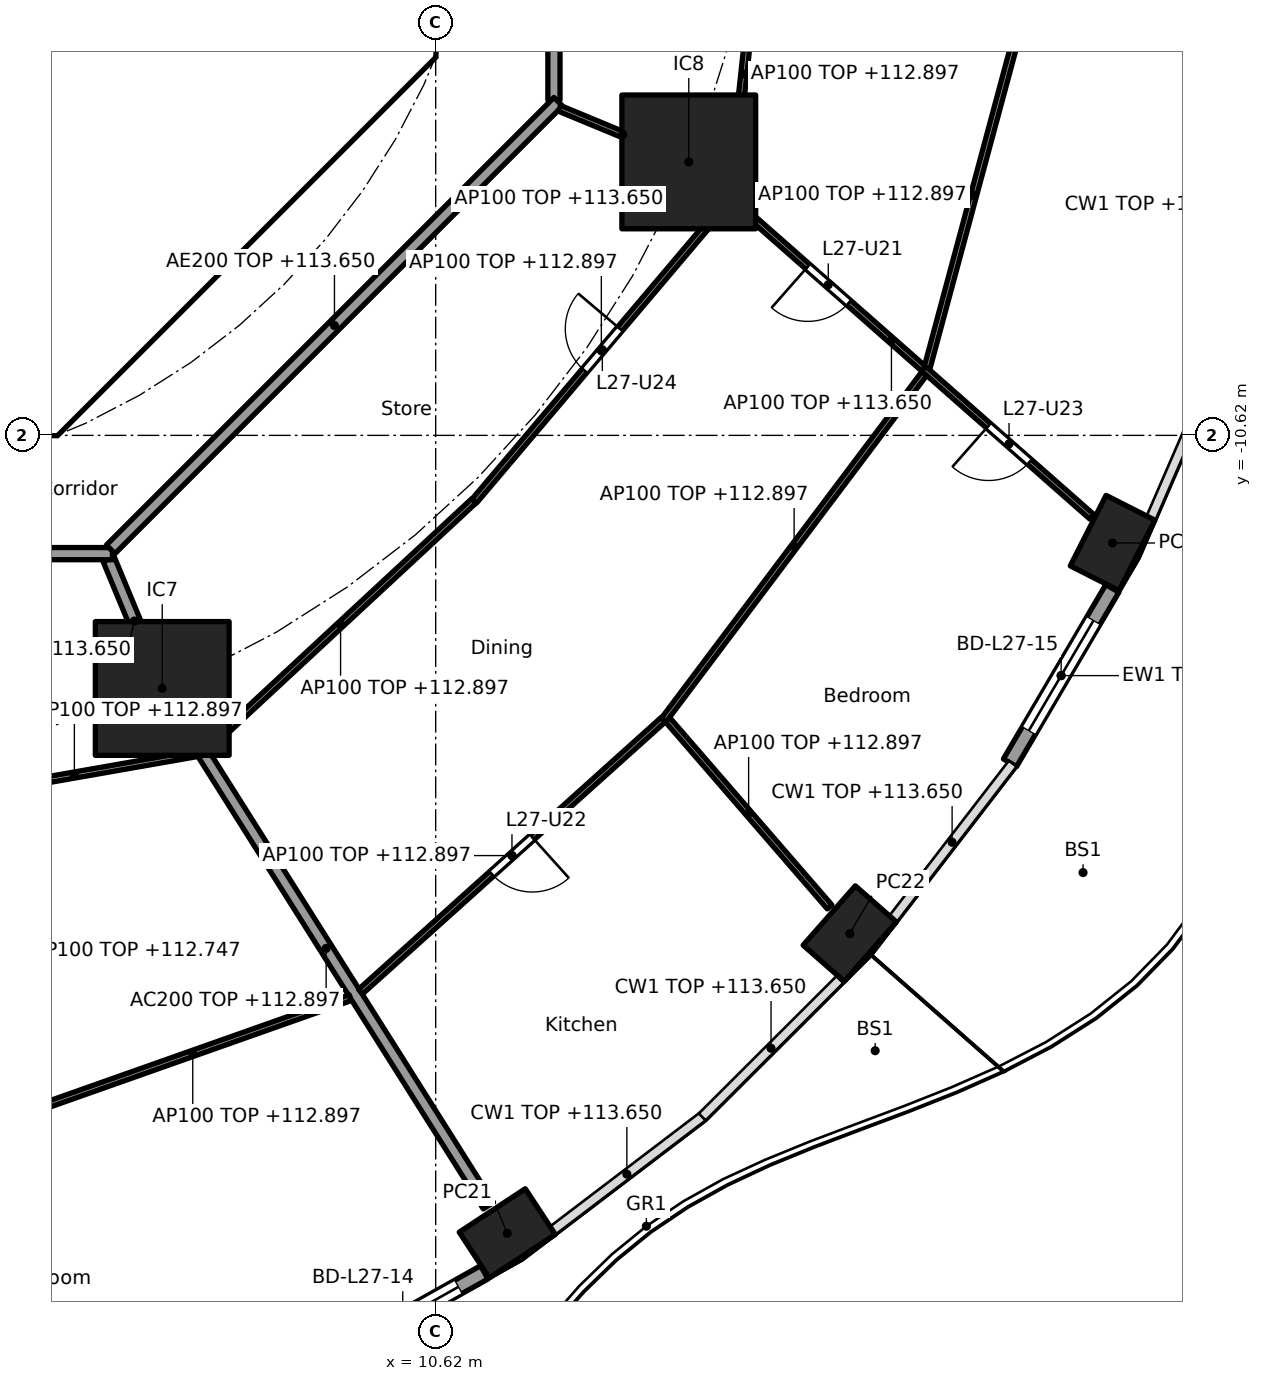
"""IFC4 building model, lengths in metres.
Left out: names, types, materials, properties, quantities, classifications, styles, units other than length and angle.
Written with IfcOpenShell. Run it as: python <this file> out.ifc"""

import sys

from ifc_helpers import new_model, si_unit, direction, frame, frame_2d, origin, origin_2d, place, context, subcontext, project, spatial, polyline, rectangle, hollow_rectangle, outline, extrude, element, fill, save


model = new_model("IFC4")
c1 = context("Model", 3, precision=1e-05, world=origin(), true_north=direction((0.0, 1.0)))
c2 = subcontext(c1, "Body", "Model", "MODEL_VIEW")
j1 = project(units=[si_unit("LENGTHUNIT", "METRE"), si_unit("PLANEANGLEUNIT", "RADIAN")], contexts=[c1])
p1 = place(None, origin())
s1 = spatial("IfcSite", under=j1, at=p1, CompositionType="ELEMENT")
p2 = place(p1, origin())
s2 = spatial("IfcBuilding", under=s1, at=p2, CompositionType="ELEMENT")
p3 = place(p2, frame((0.0, 0.0, 110.3)))
s3 = spatial("IfcBuildingStorey", under=s2, at=p3, CompositionType="ELEMENT", Elevation=110.3)
for number, where, z_axis, x_axis in (
    (1, (11.798, -23.742, 0.0), (0.0, 0.0, 1.0), (0.836, 0.549, 0.0)),
    (2, (17.43, -18.813, 0.0), (0.0, 0.0, 1.0), (0.66, 0.751, 0.0)),
    (3, (21.751, -12.39, 0.0), (0.0, 0.0, 1.0), (0.452, 0.892, 0.0)),
):
    element("IfcColumn", number, at=place(p3, frame(where, z_axis=z_axis, x_axis=x_axis)), inside=s3, PredefinedType="COLUMN", context=c2, shape_type="SweptSolid", body=[
        extrude(hollow_rectangle(XDim=1.3, YDim=0.9, WallThickness=0.045, at=origin_2d()), origin(), (0.0, 0.0, 1.0), 3.7),
    ])
for number, where, z_axis, x_axis in (
    (4, (6.123, -14.782, 0.0), (0.0, 0.0, 1.0), (1.0, 0.0, 0.0)),
    (5, (14.782, -6.123, 0.0), (0.0, 0.0, 1.0), (1.0, 0.0, 0.0)),
):
    element("IfcColumn", number, at=place(p3, frame(where, z_axis=z_axis, x_axis=x_axis)), inside=s3, PredefinedType="COLUMN", context=c2, shape_type="SweptSolid", body=[
        extrude(rectangle(XDim=2.2, YDim=2.2, at=origin_2d()), origin(), (0.0, 0.0, 1.0), 3.7),
    ])
p4 = place(p3, frame((11.419, -24.384, 0.0), z_axis=(0.0, 0.0, 1.0), x_axis=(-0.872071158476, -0.489379090843, 0.0)))
e6 = element("IfcWall", 6, at=p4, inside=s3, PredefinedType="SOLIDWALL", context=c2, shape_type="SweptSolid", body=[
    extrude(rectangle(XDim=3.076, YDim=0.25, at=frame_2d((1.538, 0.0))), origin(), (0.0, 0.0, 1.0), 3.35),
])
p5 = place(p4, frame((0.488, 0.0, 0.0)))
e7 = element("IfcOpeningElement", 7, at=p5, cuts=e6, PredefinedType="OPENING", context=c2, shape_type="SweptSolid", body=[
    extrude(rectangle(XDim=2.1, YDim=2.4, at=frame_2d((1.05, 1.2))), frame((0.0, 0.135, 0.0), z_axis=(0.0, -1.0, 0.0), x_axis=(1.0, 0.0, 0.0)), (0.0, 0.0, 1.0), 0.27),
])
p6 = place(p3, frame((21.748, -13.137, 0.0), z_axis=(0.0, 0.0, 1.0), x_axis=(-0.506297921217, -0.862358634775, 0.0)))
e8 = element("IfcWall", 8, at=p6, inside=s3, PredefinedType="SOLIDWALL", context=c2, shape_type="SweptSolid", body=[
    extrude(rectangle(XDim=3.325, YDim=0.25, at=frame_2d((1.662, 0.0))), origin(), (0.0, 0.0, 1.0), 3.35),
])
p7 = place(p6, frame((0.612, 0.0, 0.0)))
e9 = element("IfcOpeningElement", 9, at=p7, cuts=e8, PredefinedType="OPENING", context=c2, shape_type="SweptSolid", body=[
    extrude(rectangle(XDim=2.1, YDim=2.4, at=frame_2d((1.05, 1.2))), frame((0.0, 0.135, 0.0), z_axis=(0.0, -1.0, 0.0), x_axis=(1.0, 0.0, 0.0)), (0.0, 0.0, 1.0), 0.27),
])
p8 = place(p3, frame((4.613, -9.988, 0.0), z_axis=(0.0, 0.0, 1.0), x_axis=(0.707106781187, 0.707106781187, 0.0)))
e10 = element("IfcWall", 10, at=p8, inside=s3, PredefinedType="SHEAR", context=c2, shape_type="SweptSolid", body=[
    extrude(rectangle(XDim=7.602, YDim=0.6, at=frame_2d((3.801, 0.0))), origin(), (0.0, 0.0, 1.0), 3.35),
])
p9 = place(p8, frame((3.201, 0.0, 0.0)))
e11 = element("IfcOpeningElement", 11, at=p9, cuts=e10, PredefinedType="OPENING", context=c2, shape_type="SweptSolid", body=[
    extrude(rectangle(XDim=1.2, YDim=2.1, at=frame_2d((0.6, 1.05))), frame((0.0, 0.31, 0.0), z_axis=(0.0, -1.0, 0.0), x_axis=(1.0, 0.0, 0.0)), (0.0, 0.0, 1.0), 0.62),
])
p10 = place(p3, origin())
e12 = element("IfcWall", 12, at=p10, inside=s3, PredefinedType="SHEAR", context=c2, shape_type="SweptSolid", body=[
    extrude(outline(polyline([(-4.152, -10.025), (4.152, -10.025), (4.401, -9.776), (4.825, -10.2), (4.401, -10.625), (-4.401, -10.625), (-4.825, -10.2), (-4.401, -9.776), (-4.152, -10.025)])), origin(), (0.0, 0.0, 1.0), 3.35),
])
p11 = place(p3, origin())
e13 = element("IfcWall", 13, at=p11, inside=s3, PredefinedType="SHEAR", context=c2, shape_type="SweptSolid", body=[
    extrude(outline(polyline([(9.776, -4.401), (10.025, -4.152), (10.025, -3.801), (10.025, 4.152), (9.776, 4.401), (10.2, 4.825), (10.625, 4.401), (10.625, -4.401), (10.2, -4.825), (9.776, -4.401)])), origin(), (0.0, 0.0, 1.0), 3.35),
])
p12 = place(p3, frame((5.243, -12.657, 0.0), z_axis=(0.0, 0.0, 1.0), x_axis=(0.382747093259, -0.923853160736, 0.0)))
e14 = element("IfcWall", 14, at=p12, inside=s3, PredefinedType="PARTITIONING", context=c2, shape_type="SweptSolid", body=[
    extrude(rectangle(XDim=2.2, YDim=0.2, at=frame_2d((1.1, 0.0))), origin(), (0.0, 0.0, 1.0), 3.35),
])
p13 = place(p3, frame((6.15, -14.824, 0.0), z_axis=(0.0, 0.0, 1.0), x_axis=(0.533492589682, -0.845804739142, 0.0)))
e15 = element("IfcWall", 15, at=p13, inside=s3, PredefinedType="PARTITIONING", context=c2, shape_type="SweptSolid", body=[
    extrude(rectangle(XDim=10.006, YDim=0.2, at=frame_2d((5.003, 0.0))), origin(), (0.0, 0.0, 1.0), 2.597),
])
p14 = place(p3, frame((12.565, -5.104, 0.0), z_axis=(0.0, 0.0, 1.0), x_axis=(0.0, 1.0, 0.0)))
e16 = element("IfcWall", 16, at=p14, inside=s3, PredefinedType="PARTITIONING", context=c2, shape_type="SweptSolid", body=[
    extrude(rectangle(XDim=10.209, YDim=0.2, at=frame_2d((5.104, 0.0))), origin(), (0.0, 0.0, 1.0), 3.35),
])
p15 = place(p3, frame((-5.104, -12.565, 0.0), z_axis=(0.0, 0.0, 1.0), x_axis=(1.0, 0.0, 0.0)))
e17 = element("IfcWall", 17, at=p15, inside=s3, PredefinedType="PARTITIONING", context=c2, shape_type="SweptSolid", body=[
    extrude(rectangle(XDim=10.409, YDim=0.2, at=frame_2d((5.205, 0.0))), origin(), (0.0, 0.0, 1.0), 3.35),
])
p16 = place(p15, frame((2.87, 0.0, 0.0)))
e18 = element("IfcOpeningElement", 18, at=p16, cuts=e17, PredefinedType="OPENING", context=c2, shape_type="SweptSolid", body=[
    extrude(rectangle(XDim=1.0, YDim=2.1, at=frame_2d((0.5, 1.05))), frame((0.0, 0.11, 0.0), z_axis=(0.0, -1.0, 0.0), x_axis=(1.0, 0.0, 0.0)), (0.0, 0.0, 1.0), 0.22),
])
p17 = place(p3, frame((5.275, -12.494, 0.0), z_axis=(0.0, 0.0, 1.0), x_axis=(0.707106781187, 0.707106781187, 0.0)))
e19 = element("IfcWall", 19, at=p17, inside=s3, PredefinedType="PARTITIONING", context=c2, shape_type="SweptSolid", body=[
    extrude(rectangle(XDim=10.409, YDim=0.2, at=frame_2d((5.205, 0.0))), origin(), (0.0, 0.0, 1.0), 3.35),
])
p18 = place(p3, frame((2.667, -16.558, 0.0), z_axis=(0.0, 0.0, 1.0), x_axis=(0.984996445375, 0.172574629069, 0.0)))
e20 = element("IfcWall", 20, at=p18, inside=s3, PredefinedType="PARTITIONING", context=c2, shape_type="SweptSolid", body=[
    extrude(rectangle(XDim=4.084, YDim=0.1, at=frame_2d((2.042, 0.0))), origin(), (0.0, 0.0, 1.0), 2.597),
])
p19 = place(p3, frame((4.034, -21.698, 0.0), z_axis=(0.0, 0.0, 1.0), x_axis=(0.942861482644, 0.33318497047, 0.0)))
e21 = element("IfcWall", 21, at=p19, inside=s3, PredefinedType="PARTITIONING", context=c2, shape_type="SweptSolid", body=[
    extrude(rectangle(XDim=5.495, YDim=0.1, at=frame_2d((2.748, 0.0))), origin(), (0.0, 0.0, 1.0), 2.597),
])
p20 = place(p3, frame((6.861, -15.768, 0.0), z_axis=(0.0, 0.0, 1.0), x_axis=(0.733011256509, 0.680216508056, 0.0)))
e22 = element("IfcWall", 22, at=p20, inside=s3, PredefinedType="PARTITIONING", context=c2, shape_type="SweptSolid", body=[
    extrude(rectangle(XDim=5.989, YDim=0.1, at=frame_2d((2.994, 0.0))), origin(), (0.0, 0.0, 1.0), 2.597),
])
p21 = place(p3, frame((9.384, -19.768, 0.0), z_axis=(0.0, 0.0, 1.0), x_axis=(0.74387407395, 0.668319805262, 0.0)))
e23 = element("IfcWall", 23, at=p21, inside=s3, PredefinedType="PARTITIONING", context=c2, shape_type="SweptSolid", body=[
    extrude(rectangle(XDim=6.695, YDim=0.1, at=frame_2d((3.348, 0.0))), origin(), (0.0, 0.0, 1.0), 2.597),
])
p22 = place(p21, frame((2.898, 0.0, 0.0)))
e24 = element("IfcOpeningElement", 24, at=p22, cuts=e23, PredefinedType="OPENING", context=c2, shape_type="SweptSolid", body=[
    extrude(rectangle(XDim=0.9, YDim=2.1, at=frame_2d((0.45, 1.05))), frame((0.0, 0.06, 0.0), z_axis=(0.0, -1.0, 0.0), x_axis=(1.0, 0.0, 0.0)), (0.0, 0.0, 1.0), 0.12),
])
p23 = place(p3, frame((11.255, -11.699, 0.0), z_axis=(0.0, 0.0, 1.0), x_axis=(0.64610637779, 0.763247370503, 0.0)))
e25 = element("IfcWall", 25, at=p23, inside=s3, PredefinedType="PARTITIONING", context=c2, shape_type="SweptSolid", body=[
    extrude(rectangle(XDim=6.467, YDim=0.1, at=frame_2d((3.233, 0.0))), origin(), (0.0, 0.0, 1.0), 2.597),
])
p24 = place(p23, frame((2.809, 0.0, 0.0)))
e26 = element("IfcOpeningElement", 26, at=p24, cuts=e25, PredefinedType="OPENING", context=c2, shape_type="SweptSolid", body=[
    extrude(rectangle(XDim=0.9, YDim=2.1, at=frame_2d((0.45, 1.05))), frame((0.0, 0.06, 0.0), z_axis=(0.0, -1.0, 0.0), x_axis=(1.0, 0.0, 0.0)), (0.0, 0.0, 1.0), 0.12),
])
p25 = place(p3, frame((14.435, -15.297, 0.0), z_axis=(0.0, 0.0, 1.0), x_axis=(0.654405107766, -0.756144136345, 0.0)))
e27 = element("IfcWall", 27, at=p25, inside=s3, PredefinedType="PARTITIONING", context=c2, shape_type="SweptSolid", body=[
    extrude(rectangle(XDim=4.07, YDim=0.1, at=frame_2d((2.035, 0.0))), origin(), (0.0, 0.0, 1.0), 2.597),
])
p26 = place(p3, frame((14.372, -15.3, 0.0), z_axis=(0.0, 0.0, 1.0), x_axis=(0.600996629562, 0.79925155693, 0.0)))
e28 = element("IfcWall", 28, at=p26, inside=s3, PredefinedType="PARTITIONING", context=c2, shape_type="SweptSolid", body=[
    extrude(rectangle(XDim=7.13, YDim=0.1, at=frame_2d((3.565, 0.0))), origin(), (0.0, 0.0, 1.0), 2.597),
])
p27 = place(p3, frame((12.657, -5.243, 0.0), z_axis=(0.0, 0.0, 1.0), x_axis=(0.923848837015, -0.382757529444, 0.0)))
e29 = element("IfcWall", 29, at=p27, inside=s3, PredefinedType="PARTITIONING", context=c2, shape_type="SweptSolid", body=[
    extrude(rectangle(XDim=2.25, YDim=0.1, at=frame_2d((1.125, 0.0))), origin(), (0.0, 0.0, 1.0), 3.35),
])
p28 = place(p3, frame((14.82, -6.156, 0.0), z_axis=(0.0, 0.0, 1.0), x_axis=(0.750582231659, -0.660777052808, 0.0)))
e30 = element("IfcWall", 30, at=p28, inside=s3, PredefinedType="PARTITIONING", context=c2, shape_type="SweptSolid", body=[
    extrude(rectangle(XDim=8.781, YDim=0.1, at=frame_2d((4.391, 0.0))), origin(), (0.0, 0.0, 1.0), 3.35),
])
p29 = place(p28, frame((2.557, 0.0, 0.0)))
e31 = element("IfcOpeningElement", 31, at=p29, cuts=e30, PredefinedType="OPENING", context=c2, shape_type="SweptSolid", body=[
    extrude(rectangle(XDim=0.9, YDim=2.1, at=frame_2d((0.45, 1.05))), frame((0.0, 0.06, 0.0), z_axis=(0.0, -1.0, 0.0), x_axis=(1.0, 0.0, 0.0)), (0.0, 0.0, 1.0), 0.12),
])
p30 = place(p28, frame((6.517, 0.0, 0.0)))
e32 = element("IfcOpeningElement", 32, at=p30, cuts=e30, PredefinedType="OPENING", context=c2, shape_type="SweptSolid", body=[
    extrude(rectangle(XDim=0.9, YDim=2.1, at=frame_2d((0.45, 1.05))), frame((0.0, 0.06, 0.0), z_axis=(0.0, -1.0, 0.0), x_axis=(1.0, 0.0, 0.0)), (0.0, 0.0, 1.0), 0.12),
])
p31 = place(p3, frame((15.471, -6.675, 0.0), z_axis=(0.0, 0.0, 1.0), x_axis=(0.107572661837, 0.994197225114, 0.0)))
e33 = element("IfcWall", 33, at=p31, inside=s3, PredefinedType="PARTITIONING", context=c2, shape_type="SweptSolid", body=[
    extrude(rectangle(XDim=4.022, YDim=0.1, at=frame_2d((2.011, 0.0))), origin(), (0.0, 0.0, 1.0), 2.597),
])
p32 = place(p3, frame((18.7, -9.512, 0.0), z_axis=(0.0, 0.0, 1.0), x_axis=(0.260265138035, 0.965537186194, 0.0)))
e34 = element("IfcWall", 34, at=p32, inside=s3, PredefinedType="PARTITIONING", context=c2, shape_type="SweptSolid", body=[
    extrude(rectangle(XDim=5.884, YDim=0.1, at=frame_2d((2.942, 0.0))), origin(), (0.0, 0.0, 1.0), 2.597),
])
p33 = place(p5, origin())
e35 = element("IfcDoor", 35, at=p33, inside=s3, OperationType="SLIDING_TO_LEFT", PredefinedType="DOOR", context=c2, shape_type="SweptSolid", body=[
    extrude(rectangle(XDim=2.1, YDim=2.4, at=frame_2d((1.05, 1.2))), frame((0.0, 0.025, 0.0), z_axis=(0.0, -1.0, 0.0), x_axis=(1.0, 0.0, 0.0)), (0.0, 0.0, 1.0), 0.05),
])
fill(e7, e35)
p34 = place(p7, origin())
e36 = element("IfcDoor", 36, at=p34, inside=s3, OperationType="SLIDING_TO_LEFT", PredefinedType="DOOR", context=c2, shape_type="SweptSolid", body=[
    extrude(rectangle(XDim=2.1, YDim=2.4, at=frame_2d((1.05, 1.2))), frame((0.0, 0.025, 0.0), z_axis=(0.0, -1.0, 0.0), x_axis=(1.0, 0.0, 0.0)), (0.0, 0.0, 1.0), 0.05),
])
fill(e9, e36)
p35 = place(p9, origin())
e37 = element("IfcDoor", 37, at=p35, inside=s3, OperationType="SINGLE_SWING_RIGHT", PredefinedType="DOOR", context=c2, shape_type="SweptSolid", body=[
    extrude(rectangle(XDim=1.2, YDim=2.1, at=frame_2d((0.6, 1.05))), frame((0.0, 0.025, 0.0), z_axis=(0.0, -1.0, 0.0), x_axis=(1.0, 0.0, 0.0)), (0.0, 0.0, 1.0), 0.05),
])
fill(e11, e37)
p36 = place(p29, frame((0.9, 0.0, 0.0), x_axis=(-1.0, 0.0, 0.0)))
e38 = element("IfcDoor", 38, at=p36, inside=s3, OperationType="SINGLE_SWING_RIGHT", PredefinedType="DOOR", context=c2, shape_type="SweptSolid", body=[
    extrude(rectangle(XDim=0.9, YDim=2.1, at=frame_2d((0.45, 1.05))), frame((0.0, 0.025, 0.0), z_axis=(0.0, -1.0, 0.0), x_axis=(1.0, 0.0, 0.0)), (0.0, 0.0, 1.0), 0.05),
])
fill(e31, e38)
p37 = place(p22, frame((0.9, 0.0, 0.0), x_axis=(-1.0, 0.0, 0.0)))
e39 = element("IfcDoor", 39, at=p37, inside=s3, OperationType="SINGLE_SWING_LEFT", PredefinedType="DOOR", context=c2, shape_type="SweptSolid", body=[
    extrude(rectangle(XDim=0.9, YDim=2.1, at=frame_2d((0.45, 1.05))), frame((0.0, 0.025, 0.0), z_axis=(0.0, -1.0, 0.0), x_axis=(1.0, 0.0, 0.0)), (0.0, 0.0, 1.0), 0.05),
])
fill(e24, e39)
p38 = place(p30, frame((0.9, 0.0, 0.0), x_axis=(-1.0, 0.0, 0.0)))
e40 = element("IfcDoor", 40, at=p38, inside=s3, OperationType="SINGLE_SWING_RIGHT", PredefinedType="DOOR", context=c2, shape_type="SweptSolid", body=[
    extrude(rectangle(XDim=0.9, YDim=2.1, at=frame_2d((0.45, 1.05))), frame((0.0, 0.025, 0.0), z_axis=(0.0, -1.0, 0.0), x_axis=(1.0, 0.0, 0.0)), (0.0, 0.0, 1.0), 0.05),
])
fill(e32, e40)
p39 = place(p24, origin())
e41 = element("IfcDoor", 41, at=p39, inside=s3, OperationType="SINGLE_SWING_RIGHT", PredefinedType="DOOR", context=c2, shape_type="SweptSolid", body=[
    extrude(rectangle(XDim=0.9, YDim=2.1, at=frame_2d((0.45, 1.05))), frame((0.0, 0.025, 0.0), z_axis=(0.0, -1.0, 0.0), x_axis=(1.0, 0.0, 0.0)), (0.0, 0.0, 1.0), 0.05),
])
fill(e26, e41)
save(model, sys.argv[1])
